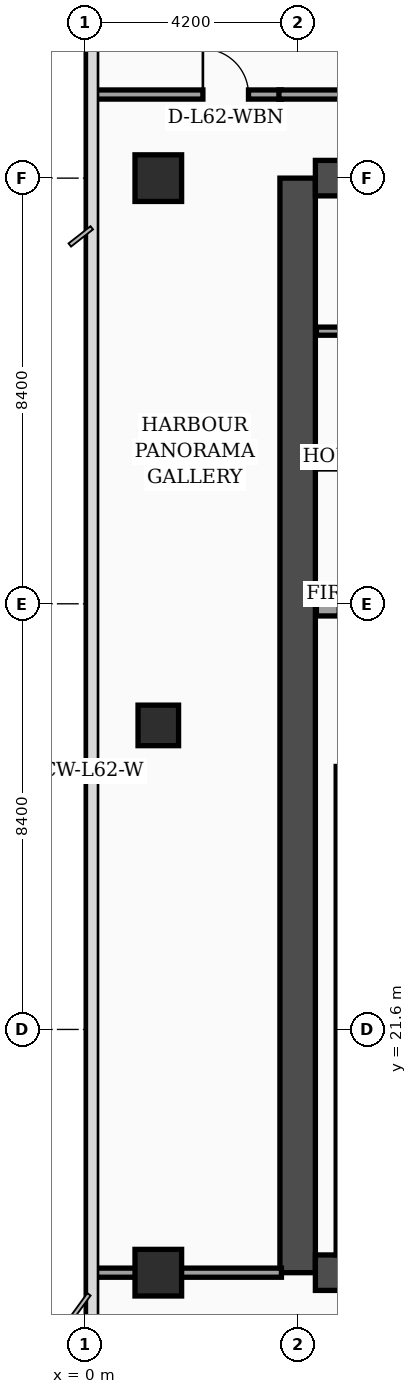
"""IFC4 building model, lengths in metres.
Left out: names, types, materials, properties, quantities, classifications, styles, units other than length and angle.
Written with IfcOpenShell. Run it as: python <this file> out.ifc"""

import sys

from ifc_helpers import new_model, si_unit, direction, frame, frame_2d, origin, origin_2d, place, context, subcontext, project, spatial, rectangle, extrude, element, fill, save


model = new_model("IFC4")
c1 = context("Model", 3, precision=1e-05, world=origin(), true_north=direction((0.0, 1.0)))
c2 = subcontext(c1, "Body", "Model", "MODEL_VIEW")
j1 = project(units=[si_unit("LENGTHUNIT", "METRE"), si_unit("PLANEANGLEUNIT", "RADIAN")], contexts=[c1])
p1 = place(None, origin())
s1 = spatial("IfcSite", under=j1, at=p1, CompositionType="ELEMENT")
p2 = place(p1, origin())
s2 = spatial("IfcBuilding", under=s1, at=p2, CompositionType="ELEMENT")
p3 = place(p2, frame((0.0, 0.0, 251.4)))
s3 = spatial("IfcBuildingStorey", under=s2, at=p3, CompositionType="ELEMENT", Elevation=251.4)
p4 = place(p3, frame((4.2, 16.8, 0.0), z_axis=(0.0, 0.0, 1.0), x_axis=(0.0, 1.0, 0.0)))
e1 = element("IfcWall", 1, at=p4, inside=s3, PredefinedType="SHEAR", context=c2, shape_type="SweptSolid", body=[
    extrude(rectangle(XDim=21.6, YDim=0.7, at=frame_2d((10.8, 0.0))), origin(), (0.0, 0.0, 1.0), 3.56),
])
p5 = place(p3, frame((4.55, 38.4, 0.0), z_axis=(0.0, 0.0, 1.0), x_axis=(1.0, 0.0, 0.0)))
e2 = element("IfcWall", 2, at=p5, inside=s3, PredefinedType="SHEAR", context=c2, shape_type="SweptSolid", body=[
    extrude(rectangle(XDim=10.1, YDim=0.7, at=frame_2d((5.05, 0.0))), origin(), (0.0, 0.0, 1.0), 3.56),
])
p6 = place(p5, frame((5.75, 0.0, 0.0)))
e3 = element("IfcOpeningElement", 3, at=p6, cuts=e2, PredefinedType="OPENING", context=c2, shape_type="SweptSolid", body=[
    extrude(rectangle(XDim=1.1, YDim=2.2, at=frame_2d((0.55, 1.1))), frame((0.0, 0.36, 0.0), z_axis=(0.0, -1.0, 0.0), x_axis=(1.0, 0.0, 0.0)), (0.0, 0.0, 1.0), 0.72),
])
p7 = place(p3, frame((4.55, 16.8, 0.0), z_axis=(0.0, 0.0, 1.0), x_axis=(1.0, 0.0, 0.0)))
e4 = element("IfcWall", 4, at=p7, inside=s3, PredefinedType="SHEAR", context=c2, shape_type="SweptSolid", body=[
    extrude(rectangle(XDim=10.1, YDim=0.7, at=frame_2d((5.05, 0.0))), origin(), (0.0, 0.0, 1.0), 3.56),
])
p8 = place(p3, frame((5.08, 17.15, 0.0), z_axis=(0.0, 0.0, 1.0), x_axis=(0.0, 1.0, 0.0)))
e5 = element("IfcWall", 5, at=p8, inside=s3, PredefinedType="SOLIDWALL", context=c2, shape_type="SweptSolid", body=[
    extrude(rectangle(XDim=9.64, YDim=0.24, at=frame_2d((4.82, 0.0))), origin(), (0.0, 0.0, 1.0), 3.56),
])
p9 = place(p3, frame((1.45, 16.8, 0.0), z_axis=(0.0, 0.0, 1.0), x_axis=(1.0, 0.0, 0.0)))
e6 = element("IfcColumn", 6, at=p9, inside=s3, PredefinedType="COLUMN", context=c2, shape_type="SweptSolid", body=[
    extrude(rectangle(XDim=0.92, YDim=0.92, at=origin_2d()), origin(), (0.0, 0.0, 1.0), 3.56),
])
p10 = place(p3, frame((1.45, 27.6, 0.0), z_axis=(0.0, 0.0, 1.0), x_axis=(1.0, 0.0, 0.0)))
e7 = element("IfcColumn", 7, at=p10, inside=s3, PredefinedType="COLUMN", context=c2, shape_type="SweptSolid", body=[
    extrude(rectangle(XDim=0.8, YDim=0.8, at=origin_2d()), origin(), (0.0, 0.0, 1.0), 3.56),
])
p11 = place(p3, frame((1.45, 38.4, 0.0), z_axis=(0.0, 0.0, 1.0), x_axis=(1.0, 0.0, 0.0)))
e8 = element("IfcColumn", 8, at=p11, inside=s3, PredefinedType="COLUMN", context=c2, shape_type="SweptSolid", body=[
    extrude(rectangle(XDim=0.92, YDim=0.92, at=origin_2d()), origin(), (0.0, 0.0, 1.0), 3.56),
])
p12 = place(p3, frame((4.57, 29.88, 0.0), z_axis=(0.0, 0.0, 1.0), x_axis=(1.0, 0.0, 0.0)))
e9 = element("IfcWall", 9, at=p12, inside=s3, PredefinedType="SOLIDWALL", context=c2, shape_type="SweptSolid", body=[
    extrude(rectangle(XDim=4.85, YDim=0.24, at=frame_2d((2.425, 0.0))), origin(), (0.0, 0.0, 1.0), 3.56),
])
p13 = place(p12, frame((0.45, 0.0, 0.0)))
e10 = element("IfcOpeningElement", 10, at=p13, cuts=e9, PredefinedType="OPENING", context=c2, shape_type="SweptSolid", body=[
    extrude(rectangle(XDim=1.3, YDim=2.35, at=frame_2d((0.65, 1.175))), frame((0.0, 0.13, 0.0), z_axis=(0.0, -1.0, 0.0), x_axis=(1.0, 0.0, 0.0)), (0.0, 0.0, 1.0), 0.26),
])
p14 = place(p3, frame((4.57, 32.78, 0.0), z_axis=(0.0, 0.0, 1.0), x_axis=(1.0, 0.0, 0.0)))
e11 = element("IfcWall", 11, at=p14, inside=s3, PredefinedType="SOLIDWALL", context=c2, shape_type="SweptSolid", body=[
    extrude(rectangle(XDim=4.85, YDim=0.24, at=frame_2d((2.425, 0.0))), origin(), (0.0, 0.0, 1.0), 3.19),
])
p15 = place(p3, frame((4.57, 35.38, 0.0), z_axis=(0.0, 0.0, 1.0), x_axis=(1.0, 0.0, 0.0)))
e12 = element("IfcWall", 12, at=p15, inside=s3, PredefinedType="PARTITIONING", context=c2, shape_type="SweptSolid", body=[
    extrude(rectangle(XDim=4.85, YDim=0.16, at=frame_2d((2.425, 0.0))), origin(), (0.0, 0.0, 1.0), 3.56),
])
p16 = place(p15, frame((1.3, 0.0, 0.0)))
e13 = element("IfcOpeningElement", 13, at=p16, cuts=e12, PredefinedType="OPENING", context=c2, shape_type="SweptSolid", body=[
    extrude(rectangle(XDim=0.98, YDim=2.15, at=frame_2d((0.49, 1.075))), frame((0.0, 0.09, 0.0), z_axis=(0.0, -1.0, 0.0), x_axis=(1.0, 0.0, 0.0)), (0.0, 0.0, 1.0), 0.18),
])
p17 = place(p3, frame((0.08, 16.8, 0.0), z_axis=(0.0, 0.0, 1.0), x_axis=(1.0, 0.0, 0.0)))
e14 = element("IfcWall", 14, at=p17, inside=s3, PredefinedType="PARTITIONING", context=c2, shape_type="SweptSolid", body=[
    extrude(rectangle(XDim=3.8, YDim=0.18, at=frame_2d((1.9, 0.0))), origin(), (0.0, 0.0, 1.0), 2.99),
])
p18 = place(p3, frame((0.08, 40.05, 0.0), z_axis=(0.0, 0.0, 1.0), x_axis=(1.0, 0.0, 0.0)))
e15 = element("IfcWall", 15, at=p18, inside=s3, PredefinedType="PARTITIONING", context=c2, shape_type="SweptSolid", body=[
    extrude(rectangle(XDim=3.8, YDim=0.18, at=frame_2d((1.9, 0.0))), origin(), (0.0, 0.0, 1.0), 2.99),
])
p19 = place(p18, frame((2.25, 0.0, 0.0)))
e16 = element("IfcOpeningElement", 16, at=p19, cuts=e15, PredefinedType="OPENING", context=c2, shape_type="SweptSolid", body=[
    extrude(rectangle(XDim=0.9, YDim=2.15, at=frame_2d((0.45, 1.075))), frame((0.0, 0.1, 0.0), z_axis=(0.0, -1.0, 0.0), x_axis=(1.0, 0.0, 0.0)), (0.0, 0.0, 1.0), 0.2),
])
p20 = place(p3, frame((3.83, 40.05, 0.0), z_axis=(0.0, 0.0, 1.0), x_axis=(1.0, 0.0, 0.0)))
e17 = element("IfcWall", 17, at=p20, inside=s3, PredefinedType="PARTITIONING", context=c2, shape_type="SweptSolid", body=[
    extrude(rectangle(XDim=11.32, YDim=0.18, at=frame_2d((5.66, 0.0))), origin(), (0.0, 0.0, 1.0), 2.99),
])
p21 = place(p19, origin())
e18 = element("IfcDoor", 18, at=p21, inside=s3, OperationType="SINGLE_SWING_LEFT", PredefinedType="DOOR", context=c2, shape_type="SweptSolid", body=[
    extrude(rectangle(XDim=0.9, YDim=2.15, at=frame_2d((0.45, 1.075))), frame((0.0, 0.025, 0.0), z_axis=(0.0, -1.0, 0.0), x_axis=(1.0, 0.0, 0.0)), (0.0, 0.0, 1.0), 0.05),
])
fill(e16, e18)
save(model, sys.argv[1])
